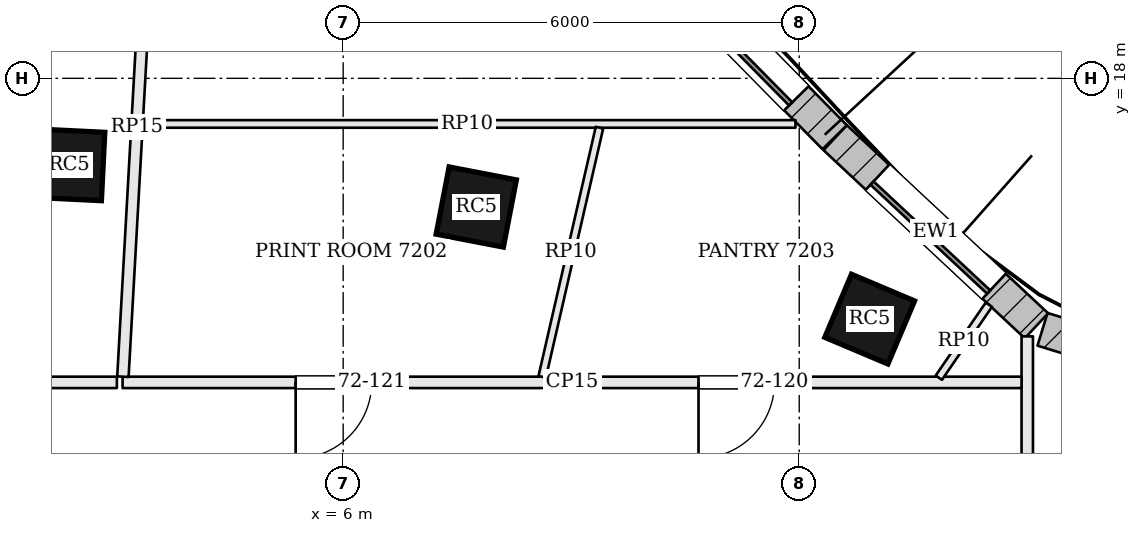
"""IFC4 building model, lengths in metres.
Left out: names, types, materials, properties, quantities, classifications, styles, units other than length and angle.
Written with IfcOpenShell. Run it as: python <this file> out.ifc"""

import sys

from ifc_helpers import new_model, si_unit, direction, frame, frame_2d, origin, origin_2d, place, context, subcontext, project, spatial, rectangle, extrude, element, fill, save


model = new_model("IFC4")
c1 = context("Model", 3, precision=1e-05, world=origin(), true_north=direction((0.0, 1.0)))
c2 = subcontext(c1, "Body", "Model", "MODEL_VIEW")
j1 = project(units=[si_unit("LENGTHUNIT", "METRE"), si_unit("PLANEANGLEUNIT", "RADIAN")], contexts=[c1])
p1 = place(None, origin())
s1 = spatial("IfcSite", under=j1, at=p1, CompositionType="ELEMENT")
p2 = place(p1, origin())
s2 = spatial("IfcBuilding", under=s1, at=p2, CompositionType="ELEMENT")
p3 = place(p2, frame((0.0, 0.0, 292.2)))
s3 = spatial("IfcBuildingStorey", under=s2, at=p3, CompositionType="ELEMENT", Elevation=292.2)
for number, where, z_axis, x_axis in (
    (1, (12.927, 14.832, 0.0), (0.0, 0.0, 1.0), (-0.921, 0.389, 0.0)),
    (2, (7.751, 16.307, 0.0), (0.0, 0.0, 1.0), (-0.982, 0.189, 0.0)),
    (3, (2.392, 16.862, 0.0), (0.0, 0.0, 1.0), (-0.999, 0.049, 0.0)),
):
    element("IfcColumn", number, at=place(p3, frame(where, z_axis=z_axis, x_axis=x_axis)), inside=s3, PredefinedType="COLUMN", context=c2, shape_type="SweptSolid", body=[
        extrude(rectangle(XDim=0.9, YDim=0.9, at=origin_2d()), origin(), (0.0, 0.0, 1.0), 3.9),
    ])
p4 = place(p3, frame((18.958, 13.542, 0.0), z_axis=(0.0, 0.0, 1.0), x_axis=(-0.955792437529, 0.294042201668, 0.0)))
e4 = element("IfcWall", 4, at=p4, inside=s3, PredefinedType="SOLIDWALL", context=c2, shape_type="SweptSolid", body=[
    extrude(rectangle(XDim=3.931, YDim=0.45, at=frame_2d((1.965, 0.0))), origin(), (0.0, 0.0, 1.0), 3.7),
])
p5 = place(p4, frame((0.915, 0.0, 0.9)))
e5 = element("IfcOpeningElement", 5, at=p5, cuts=e4, PredefinedType="OPENING", context=c2, shape_type="SweptSolid", body=[
    extrude(rectangle(XDim=2.1, YDim=2.3, at=frame_2d((1.05, 1.15))), frame((0.0, 0.235, 0.0), z_axis=(0.0, -1.0, 0.0), x_axis=(1.0, 0.0, 0.0)), (0.0, 0.0, 1.0), 0.47),
])
p6 = place(p3, frame((15.121, 14.745, 0.0), z_axis=(0.0, 0.0, 1.0), x_axis=(-0.730618259172, 0.68278617397, 0.0)))
e6 = element("IfcWall", 6, at=p6, inside=s3, PredefinedType="SOLIDWALL", context=c2, shape_type="SweptSolid", body=[
    extrude(rectangle(XDim=3.624, YDim=0.45, at=frame_2d((1.812, 0.0))), origin(), (0.0, 0.0, 1.0), 3.7),
])
p7 = place(p6, frame((0.762, 0.0, 0.9)))
e7 = element("IfcOpeningElement", 7, at=p7, cuts=e6, PredefinedType="OPENING", context=c2, shape_type="SweptSolid", body=[
    extrude(rectangle(XDim=2.1, YDim=2.3, at=frame_2d((1.05, 1.15))), frame((0.0, 0.235, 0.0), z_axis=(0.0, -1.0, 0.0), x_axis=(1.0, 0.0, 0.0)), (0.0, 0.0, 1.0), 0.47),
])
p8 = place(p3, frame((12.466, 17.226, 0.0), z_axis=(0.0, 0.0, 1.0), x_axis=(-0.701875966769, 0.712299183821, 0.0)))
e8 = element("IfcWall", 8, at=p8, inside=s3, PredefinedType="SOLIDWALL", context=c2, shape_type="SweptSolid", body=[
    extrude(rectangle(XDim=3.537, YDim=0.45, at=frame_2d((1.769, 0.0))), origin(), (0.0, 0.0, 1.0), 3.7),
])
p9 = place(p8, frame((0.718, 0.0, 0.9)))
e9 = element("IfcOpeningElement", 9, at=p9, cuts=e8, PredefinedType="OPENING", context=c2, shape_type="SweptSolid", body=[
    extrude(rectangle(XDim=2.1, YDim=2.3, at=frame_2d((1.05, 1.15))), frame((0.0, 0.235, 0.0), z_axis=(0.0, -1.0, 0.0), x_axis=(1.0, 0.0, 0.0)), (0.0, 0.0, 1.0), 0.47),
])
p10 = place(p3, frame((12.0, 17.805, 3.9), z_axis=(0.0, 0.0, 1.0), x_axis=(-0.701926718972, 0.712249170721, 0.0)))
e10 = element("IfcWall", 10, at=p10, inside=s3, PredefinedType="PARAPET", context=c2, shape_type="SweptSolid", body=[
    extrude(rectangle(XDim=2.72, YDim=0.3, at=frame_2d((1.36, 0.0))), origin(), (0.0, 0.0, 1.0), 1.1),
])
p11 = place(p3, frame((15.0, 7.979, 0.0), z_axis=(0.0, 0.0, 1.0), x_axis=(0.0, 1.0, 0.0)))
e11 = element("IfcWall", 11, at=p11, inside=s3, PredefinedType="PARTITIONING", context=c2, shape_type="SweptSolid", body=[
    extrude(rectangle(XDim=6.626, YDim=0.15, at=frame_2d((3.313, 0.0))), origin(), (0.0, 0.0, 1.0), 3.198),
])
p12 = place(p11, frame((0.759, 0.0, 0.0)))
e12 = element("IfcOpeningElement", 12, at=p12, cuts=e11, PredefinedType="OPENING", context=c2, shape_type="SweptSolid", body=[
    extrude(rectangle(XDim=1.8, YDim=2.1, at=frame_2d((0.9, 1.05))), frame((0.0, 0.085, 0.0), z_axis=(0.0, -1.0, 0.0), x_axis=(1.0, 0.0, 0.0)), (0.0, 0.0, 1.0), 0.17),
])
p13 = place(p3, frame((14.925, 14.0, 0.0), z_axis=(0.0, 0.0, 1.0), x_axis=(-1.0, 0.0, 0.0)))
e13 = element("IfcWall", 13, at=p13, inside=s3, PredefinedType="PARTITIONING", context=c2, shape_type="SweptSolid", body=[
    extrude(rectangle(XDim=11.827, YDim=0.15, at=frame_2d((5.914, 0.0))), origin(), (0.0, 0.0, 1.0), 3.198),
])
p14 = place(p13, frame((3.25, 0.0, 0.0)))
e14 = element("IfcOpeningElement", 14, at=p14, cuts=e13, PredefinedType="OPENING", context=c2, shape_type="SweptSolid", body=[
    extrude(rectangle(XDim=1.0, YDim=2.1, at=frame_2d((0.5, 1.05))), frame((0.0, 0.085, 0.0), z_axis=(0.0, -1.0, 0.0), x_axis=(1.0, 0.0, 0.0)), (0.0, 0.0, 1.0), 0.17),
])
p15 = place(p13, frame((8.55, 0.0, 0.0)))
e15 = element("IfcOpeningElement", 15, at=p15, cuts=e13, PredefinedType="OPENING", context=c2, shape_type="SweptSolid", body=[
    extrude(rectangle(XDim=1.0, YDim=2.1, at=frame_2d((0.5, 1.05))), frame((0.0, 0.085, 0.0), z_axis=(0.0, -1.0, 0.0), x_axis=(1.0, 0.0, 0.0)), (0.0, 0.0, 1.0), 0.17),
])
p16 = place(p3, frame((3.47, 20.638, 0.0), z_axis=(0.0, 0.0, 1.0), x_axis=(-0.055969858851, -0.998432458857, 0.0)))
e16 = element("IfcWall", 16, at=p16, inside=s3, PredefinedType="PARTITIONING", context=c2, shape_type="SweptSolid", body=[
    extrude(rectangle(XDim=6.573, YDim=0.15, at=frame_2d((3.287, 0.0))), origin(), (0.0, 0.0, 1.0), 3.234),
])
p17 = place(p3, frame((3.023, 14.0, 0.0), z_axis=(0.0, 0.0, 1.0), x_axis=(-1.0, 0.0, 0.0)))
e17 = element("IfcWall", 17, at=p17, inside=s3, PredefinedType="PARTITIONING", context=c2, shape_type="SweptSolid", body=[
    extrude(rectangle(XDim=16.684, YDim=0.15, at=frame_2d((8.342, 0.0))), origin(), (0.0, 0.0, 1.0), 3.198),
])
p18 = place(p17, frame((10.628, 0.0, 0.0)))
e18 = element("IfcOpeningElement", 18, at=p18, cuts=e17, PredefinedType="OPENING", context=c2, shape_type="SweptSolid", body=[
    extrude(rectangle(XDim=1.8, YDim=2.1, at=frame_2d((0.9, 1.05))), frame((0.0, 0.085, 0.0), z_axis=(0.0, -1.0, 0.0), x_axis=(1.0, 0.0, 0.0)), (0.0, 0.0, 1.0), 0.17),
])
p19 = place(p3, frame((3.309, 17.4, 0.0), z_axis=(0.0, 0.0, 1.0), x_axis=(1.0, 0.0, 0.0)))
e19 = element("IfcWall", 19, at=p19, inside=s3, PredefinedType="PARTITIONING", context=c2, shape_type="SweptSolid", body=[
    extrude(rectangle(XDim=8.642, YDim=0.1, at=frame_2d((4.321, 0.0))), origin(), (0.0, 0.0, 1.0), 3.198),
])
p20 = place(p3, frame((13.837, 14.062, 0.0), z_axis=(0.0, 0.0, 1.0), x_axis=(0.565495744886, 0.824751212497, 0.0)))
e20 = element("IfcWall", 20, at=p20, inside=s3, PredefinedType="PARTITIONING", context=c2, shape_type="SweptSolid", body=[
    extrude(rectangle(XDim=1.164, YDim=0.1, at=frame_2d((0.582, 0.0))), origin(), (0.0, 0.0, 1.0), 3.198),
])
p21 = place(p3, frame((8.618, 14.073, 0.0), z_axis=(0.0, 0.0, 1.0), x_axis=(0.224048430302, 0.974578011695, 0.0)))
e21 = element("IfcWall", 21, at=p21, inside=s3, PredefinedType="PARTITIONING", context=c2, shape_type="SweptSolid", body=[
    extrude(rectangle(XDim=3.364, YDim=0.1, at=frame_2d((1.682, 0.0))), origin(), (0.0, 0.0, 1.0), 3.198),
])
p22 = place(p7, origin())
e22 = element("IfcWindow", 22, at=p22, inside=s3, PartitioningType="SINGLE_PANEL", PredefinedType="WINDOW", context=c2, shape_type="SweptSolid", body=[
    extrude(rectangle(XDim=2.1, YDim=2.3, at=frame_2d((1.05, 1.15))), frame((0.0, 0.135, 0.0), z_axis=(0.0, -1.0, 0.0), x_axis=(1.0, 0.0, 0.0)), (0.0, 0.0, 1.0), 0.06),
])
fill(e7, e22)
p23 = place(p9, origin())
e23 = element("IfcWindow", 23, at=p23, inside=s3, PartitioningType="SINGLE_PANEL", PredefinedType="WINDOW", context=c2, shape_type="SweptSolid", body=[
    extrude(rectangle(XDim=2.1, YDim=2.3, at=frame_2d((1.05, 1.15))), frame((0.0, 0.135, 0.0), z_axis=(0.0, -1.0, 0.0), x_axis=(1.0, 0.0, 0.0)), (0.0, 0.0, 1.0), 0.06),
])
fill(e9, e23)
p24 = place(p14, origin())
e24 = element("IfcDoor", 24, at=p24, inside=s3, OperationType="SINGLE_SWING_RIGHT", PredefinedType="DOOR", context=c2, shape_type="SweptSolid", body=[
    extrude(rectangle(XDim=1.0, YDim=2.1, at=frame_2d((0.5, 1.05))), frame((0.0, 0.025, 0.0), z_axis=(0.0, -1.0, 0.0), x_axis=(1.0, 0.0, 0.0)), (0.0, 0.0, 1.0), 0.05),
])
fill(e14, e24)
p25 = place(p15, origin())
e25 = element("IfcDoor", 25, at=p25, inside=s3, OperationType="SINGLE_SWING_RIGHT", PredefinedType="DOOR", context=c2, shape_type="SweptSolid", body=[
    extrude(rectangle(XDim=1.0, YDim=2.1, at=frame_2d((0.5, 1.05))), frame((0.0, 0.025, 0.0), z_axis=(0.0, -1.0, 0.0), x_axis=(1.0, 0.0, 0.0)), (0.0, 0.0, 1.0), 0.05),
])
fill(e15, e25)
save(model, sys.argv[1])
